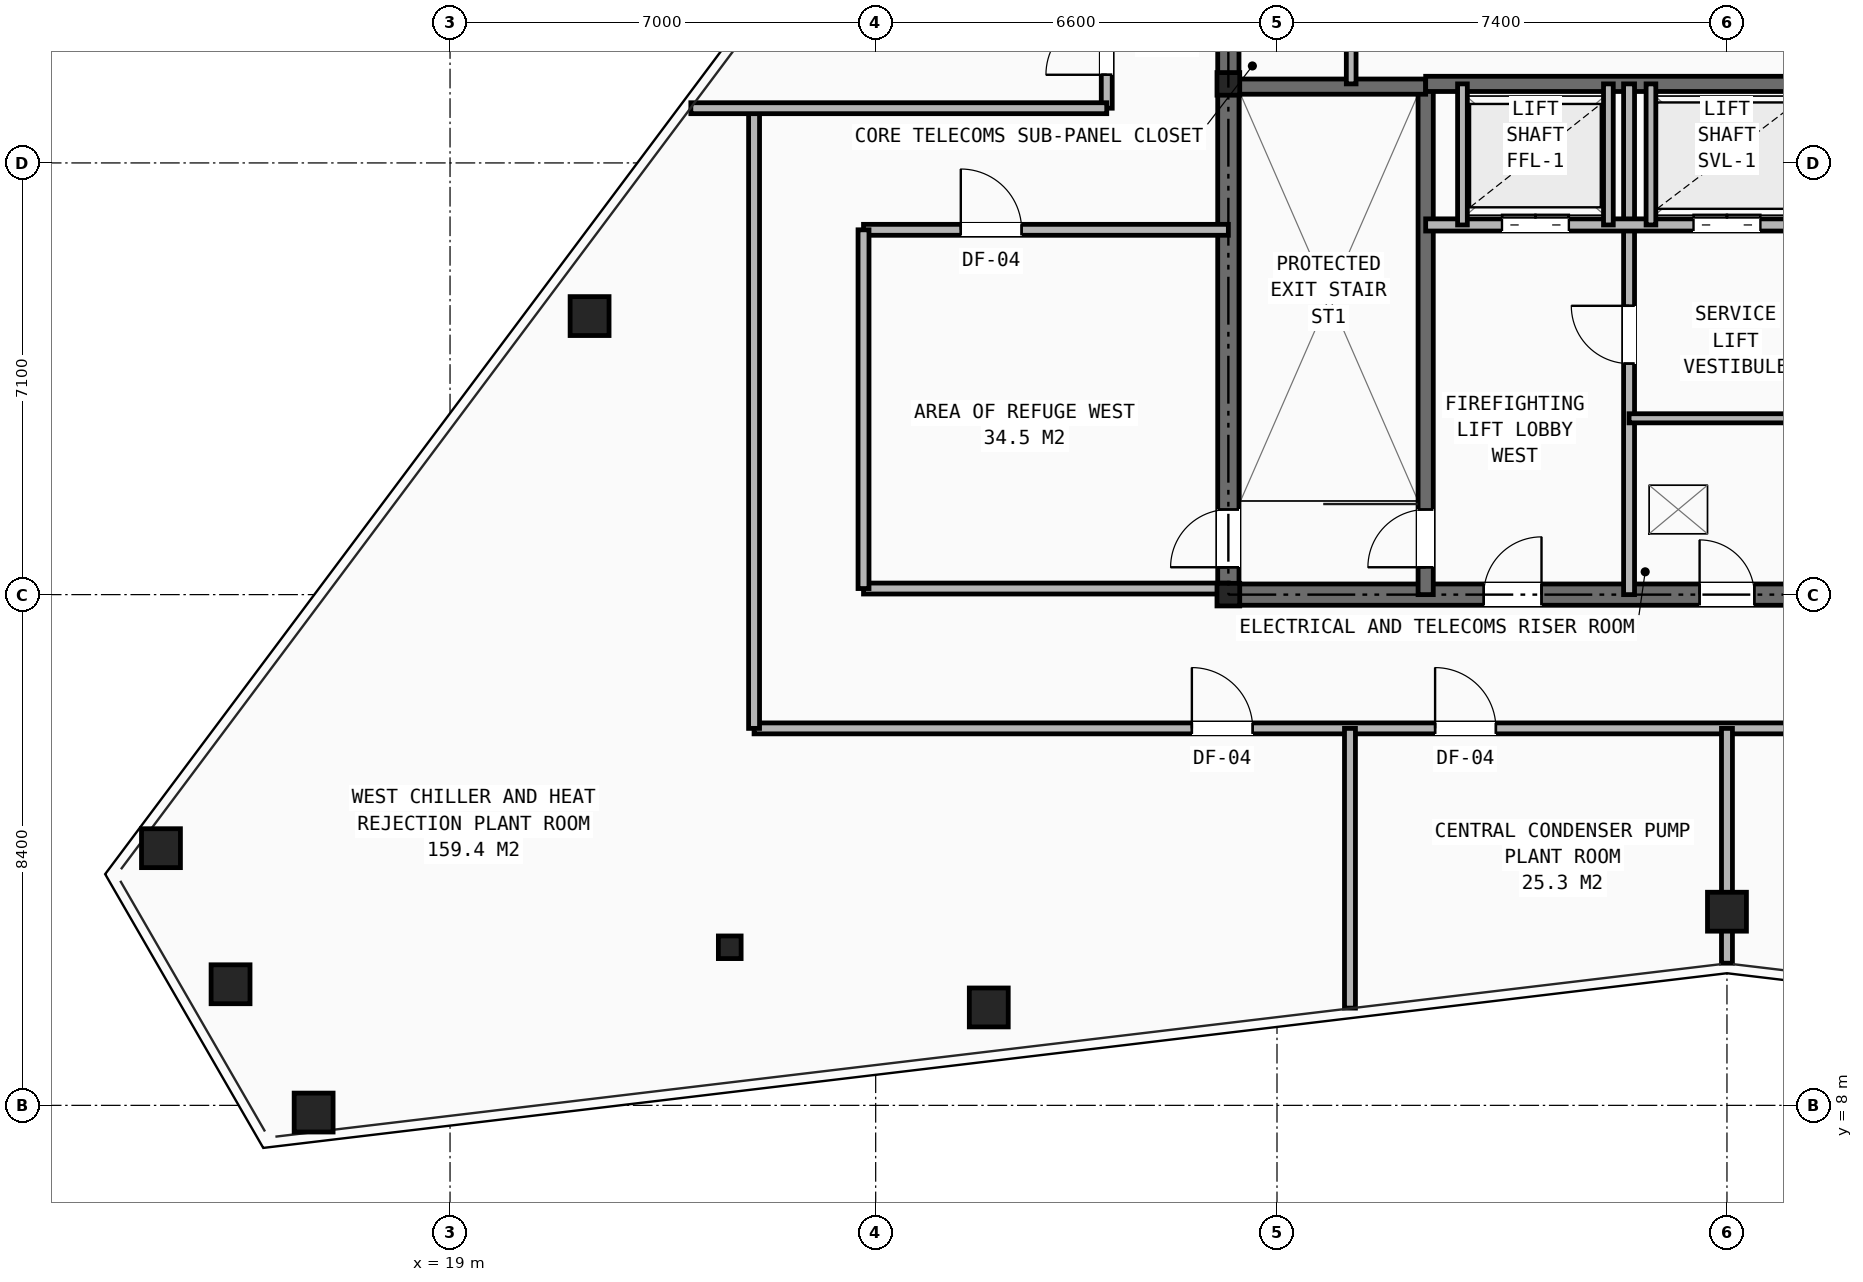
"""IFC4 building model, lengths in metres.
Left out: names, types, materials, properties, quantities, classifications, styles, units other than length and angle.
Written with IfcOpenShell. Run it as: python <this file> out.ifc"""

import sys

from ifc_helpers import new_model, si_unit, direction, frame, frame_2d, origin, origin_2d, place, context, subcontext, project, spatial, rectangle, hollow_rectangle, i_section, extrude, element, fill, save


model = new_model("IFC4")
c1 = context("Model", 3, precision=1e-05, world=origin(), true_north=direction((0.0, 1.0)))
c2 = subcontext(c1, "Body", "Model", "MODEL_VIEW")
j1 = project(units=[si_unit("LENGTHUNIT", "METRE"), si_unit("PLANEANGLEUNIT", "RADIAN")], contexts=[c1])
p1 = place(None, origin())
s1 = spatial("IfcSite", under=j1, at=p1, CompositionType="ELEMENT")
p2 = place(p1, origin())
s2 = spatial("IfcBuilding", under=s1, at=p2, CompositionType="ELEMENT")
p3 = place(p2, frame((0.0, 0.0, 290.0)))
s3 = spatial("IfcBuildingStorey", under=s2, at=p3, CompositionType="ELEMENT", Elevation=290.0)
for number, where, z_axis, x_axis in (
    (1, (31.8, 16.4, 0.0), (0.0, 0.0, 1.0), (1.0, 0.0, 0.0)),
    (2, (31.8, 24.8, 0.0), (0.0, 0.0, 1.0), (1.0, 0.0, 0.0)),
    (3, (23.6, 10.6, 0.0), (0.0, 0.0, 1.0), (1.0, 0.0, 0.0)),
):
    element("IfcColumn", number, at=place(p3, frame(where, z_axis=z_axis, x_axis=x_axis)), inside=s3, PredefinedType="COLUMN", context=c2, shape_type="SweptSolid", body=[
        extrude(i_section(OverallWidth=0.374, OverallDepth=0.372, WebThickness=0.016, FlangeThickness=0.026, at=origin_2d()), origin(), (0.0, 0.0, 1.0), 4.8),
    ])
for number, where, z_axis, x_axis in (
    (4, (21.295, 20.981, 0.0), (0.0, 0.0, 1.0), (1.0, 0.0, 0.0)),
    (5, (14.246, 12.23, 0.0), (0.0, 0.0, 1.0), (1.0, 0.0, 0.0)),
    (6, (15.39, 9.992, 0.0), (0.0, 0.0, 1.0), (1.0, 0.0, 0.0)),
    (7, (16.757, 7.882, 0.0), (0.0, 0.0, 1.0), (1.0, 0.0, 0.0)),
    (8, (27.86, 9.61, 0.0), (0.0, 0.0, 1.0), (1.0, 0.0, 0.0)),
    (9, (40.0, 11.185, 0.0), (0.0, 0.0, 1.0), (1.0, 0.0, 0.0)),
):
    element("IfcColumn", number, at=place(p3, frame(where, z_axis=z_axis, x_axis=x_axis)), inside=s3, PredefinedType="COLUMN", context=c2, shape_type="SweptSolid", body=[
        extrude(hollow_rectangle(XDim=0.64, YDim=0.64, WallThickness=0.045, at=origin_2d()), origin(), (0.0, 0.0, 1.0), 4.8),
    ])
p4 = place(p3, frame((31.8, 16.4, 0.0), z_axis=(0.0, 0.0, 1.0), x_axis=(1.0, 0.0, 0.0)))
e10 = element("IfcWall", 10, at=p4, inside=s3, PredefinedType="SHEAR", context=c2, shape_type="SweptSolid", body=[
    extrude(rectangle(XDim=16.4, YDim=0.35, at=frame_2d((8.2, 0.0))), origin(), (0.0, 0.0, 1.0), 4.54),
])
p5 = place(p4, frame((7.75, 0.0, 0.0)))
e11 = element("IfcOpeningElement", 11, at=p5, cuts=e10, PredefinedType="OPENING", context=c2, shape_type="SweptSolid", body=[
    extrude(rectangle(XDim=0.9, YDim=2.1, at=frame_2d((0.45, 1.05))), frame((0.0, 0.185, 0.0), z_axis=(0.0, -1.0, 0.0), x_axis=(1.0, 0.0, 0.0)), (0.0, 0.0, 1.0), 0.37),
])
p6 = place(p4, frame((4.2, 0.0, 0.0)))
e12 = element("IfcOpeningElement", 12, at=p6, cuts=e10, PredefinedType="OPENING", context=c2, shape_type="SweptSolid", body=[
    extrude(rectangle(XDim=0.95, YDim=2.1, at=frame_2d((0.475, 1.05))), frame((0.0, 0.185, 0.0), z_axis=(0.0, -1.0, 0.0), x_axis=(1.0, 0.0, 0.0)), (0.0, 0.0, 1.0), 0.37),
])
p7 = place(p4, frame((10.6, 0.0, 0.0)))
e13 = element("IfcOpeningElement", 13, at=p7, cuts=e10, PredefinedType="OPENING", context=c2, shape_type="SweptSolid", body=[
    extrude(rectangle(XDim=0.95, YDim=2.1, at=frame_2d((0.475, 1.05))), frame((0.0, 0.185, 0.0), z_axis=(0.0, -1.0, 0.0), x_axis=(1.0, 0.0, 0.0)), (0.0, 0.0, 1.0), 0.37),
])
p8 = place(p3, frame((31.8, 16.4, 0.0), z_axis=(0.0, 0.0, 1.0), x_axis=(0.0, 1.0, 0.0)))
e14 = element("IfcWall", 14, at=p8, inside=s3, PredefinedType="SHEAR", context=c2, shape_type="SweptSolid", body=[
    extrude(rectangle(XDim=14.8, YDim=0.35, at=frame_2d((7.4, 0.0))), origin(), (0.0, 0.0, 1.0), 4.54),
])
p9 = place(p8, frame((11.0, 0.0, 0.0)))
e15 = element("IfcOpeningElement", 15, at=p9, cuts=e14, PredefinedType="OPENING", context=c2, shape_type="SweptSolid", body=[
    extrude(rectangle(XDim=1.1, YDim=2.15, at=frame_2d((0.55, 1.075))), frame((0.0, 0.185, 0.0), z_axis=(0.0, -1.0, 0.0), x_axis=(1.0, 0.0, 0.0)), (0.0, 0.0, 1.0), 0.37),
])
p10 = place(p8, frame((0.45, 0.0, 0.0)))
e16 = element("IfcOpeningElement", 16, at=p10, cuts=e14, PredefinedType="OPENING", context=c2, shape_type="SweptSolid", body=[
    extrude(rectangle(XDim=0.95, YDim=2.1, at=frame_2d((0.475, 1.05))), frame((0.0, 0.185, 0.0), z_axis=(0.0, -1.0, 0.0), x_axis=(1.0, 0.0, 0.0)), (0.0, 0.0, 1.0), 0.37),
])
p11 = place(p3, frame((35.045, 16.4, 0.0), z_axis=(0.0, 0.0, 1.0), x_axis=(0.0, 1.0, 0.0)))
e17 = element("IfcWall", 17, at=p11, inside=s3, PredefinedType="SHEAR", context=c2, shape_type="SweptSolid", body=[
    extrude(rectangle(XDim=8.4, YDim=0.25, at=frame_2d((4.2, 0.0))), origin(), (0.0, 0.0, 1.0), 4.54),
])
p12 = place(p11, frame((0.45, 0.0, 0.0)))
e18 = element("IfcOpeningElement", 18, at=p12, cuts=e17, PredefinedType="OPENING", context=c2, shape_type="SweptSolid", body=[
    extrude(rectangle(XDim=0.95, YDim=2.1, at=frame_2d((0.475, 1.05))), frame((0.0, 0.135, 0.0), z_axis=(0.0, -1.0, 0.0), x_axis=(1.0, 0.0, 0.0)), (0.0, 0.0, 1.0), 0.27),
])
p13 = place(p3, frame((31.8, 24.755, 0.0), z_axis=(0.0, 0.0, 1.0), x_axis=(1.0, 0.0, 0.0)))
e19 = element("IfcWall", 19, at=p13, inside=s3, PredefinedType="SHEAR", context=c2, shape_type="SweptSolid", body=[
    extrude(rectangle(XDim=3.245, YDim=0.25, at=frame_2d((1.623, 0.0))), origin(), (0.0, 0.0, 1.0), 4.54),
])
p14 = place(p3, frame((35.045, 24.8, 0.0), z_axis=(0.0, 0.0, 1.0), x_axis=(1.0, 0.0, 0.0)))
e20 = element("IfcWall", 20, at=p14, inside=s3, PredefinedType="SHEAR", context=c2, shape_type="SweptSolid", body=[
    extrude(rectangle(XDim=9.91, YDim=0.25, at=frame_2d((4.955, 0.0))), origin(), (0.0, 0.0, 1.0), 4.54),
])
p15 = place(p3, frame((38.39, 16.4, 0.0), z_axis=(0.0, 0.0, 1.0), x_axis=(0.0, 1.0, 0.0)))
e21 = element("IfcWall", 21, at=p15, inside=s3, PredefinedType="PARTITIONING", context=c2, shape_type="SweptSolid", body=[
    extrude(rectangle(XDim=8.4, YDim=0.18, at=frame_2d((4.2, 0.0))), origin(), (0.0, 0.0, 1.0), 3.995),
])
p16 = place(p15, frame((3.8, 0.0, 0.0)))
e22 = element("IfcOpeningElement", 22, at=p16, cuts=e21, PredefinedType="OPENING", context=c2, shape_type="SweptSolid", body=[
    extrude(rectangle(XDim=0.95, YDim=2.1, at=frame_2d((0.475, 1.05))), frame((0.0, 0.1, 0.0), z_axis=(0.0, -1.0, 0.0), x_axis=(1.0, 0.0, 0.0)), (0.0, 0.0, 1.0), 0.2),
])
p17 = place(p3, frame((35.045, 22.48, 0.0), z_axis=(0.0, 0.0, 1.0), x_axis=(1.0, 0.0, 0.0)))
e23 = element("IfcWall", 23, at=p17, inside=s3, PredefinedType="SOLIDWALL", context=c2, shape_type="SweptSolid", body=[
    extrude(rectangle(XDim=9.91, YDim=0.2, at=frame_2d((4.955, 0.0))), origin(), (0.0, 0.0, 1.0), 4.54),
])
p18 = place(p17, frame((1.255, 0.0, 0.0)))
e24 = element("IfcOpeningElement", 24, at=p18, cuts=e23, PredefinedType="OPENING", context=c2, shape_type="SweptSolid", body=[
    extrude(rectangle(XDim=1.1, YDim=2.15, at=frame_2d((0.55, 1.075))), frame((0.0, 0.11, 0.0), z_axis=(0.0, -1.0, 0.0), x_axis=(1.0, 0.0, 0.0)), (0.0, 0.0, 1.0), 0.22),
])
p19 = place(p17, frame((7.555, 0.0, 0.0)))
e25 = element("IfcOpeningElement", 25, at=p19, cuts=e23, PredefinedType="OPENING", context=c2, shape_type="SweptSolid", body=[
    extrude(rectangle(XDim=1.1, YDim=2.15, at=frame_2d((0.55, 1.075))), frame((0.0, 0.11, 0.0), z_axis=(0.0, -1.0, 0.0), x_axis=(1.0, 0.0, 0.0)), (0.0, 0.0, 1.0), 0.22),
])
p20 = place(p17, frame((4.405, 0.0, 0.0)))
e26 = element("IfcOpeningElement", 26, at=p20, cuts=e23, PredefinedType="OPENING", context=c2, shape_type="SweptSolid", body=[
    extrude(rectangle(XDim=1.1, YDim=2.15, at=frame_2d((0.55, 1.075))), frame((0.0, 0.11, 0.0), z_axis=(0.0, -1.0, 0.0), x_axis=(1.0, 0.0, 0.0)), (0.0, 0.0, 1.0), 0.22),
])
p21 = place(p3, frame((38.39, 19.3, 0.0), z_axis=(0.0, 0.0, 1.0), x_axis=(1.0, 0.0, 0.0)))
e27 = element("IfcWall", 27, at=p21, inside=s3, PredefinedType="PARTITIONING", context=c2, shape_type="SweptSolid", body=[
    extrude(rectangle(XDim=3.22, YDim=0.15, at=frame_2d((1.61, 0.0))), origin(), (0.0, 0.0, 1.0), 4.54),
])
for number, where, z_axis, x_axis in (
    (28, (35.65, 22.48, 0.0), (0.0, 0.0, 1.0), (0.0, 1.0, 0.0)),
    (29, (38.05, 22.48, 0.0), (0.0, 0.0, 1.0), (0.0, 1.0, 0.0)),
    (30, (38.75, 22.48, 0.0), (0.0, 0.0, 1.0), (0.0, 1.0, 0.0)),
):
    element("IfcWall", number, at=place(p3, frame(where, z_axis=z_axis, x_axis=x_axis)), inside=s3, PredefinedType="SOLIDWALL", context=c2, shape_type="SweptSolid", body=[
        extrude(rectangle(XDim=2.32, YDim=0.16, at=frame_2d((1.16, 0.0))), origin(), (0.0, 0.0, 1.0), 4.54),
    ])
p22 = place(p3, frame((33.82, 24.8, 0.0), z_axis=(0.0, 0.0, 1.0), x_axis=(0.0, 1.0, 0.0)))
e31 = element("IfcWall", 31, at=p22, inside=s3, PredefinedType="SOLIDWALL", context=c2, shape_type="SweptSolid", body=[
    extrude(rectangle(XDim=2.08, YDim=0.16, at=frame_2d((1.04, 0.0))), origin(), (0.0, 0.0, 1.0), 4.54),
])
p23 = place(p3, frame((24.0, 14.2, 0.0), z_axis=(0.0, 0.0, 1.0), x_axis=(1.0, 0.0, 0.0)))
e32 = element("IfcWall", 32, at=p23, inside=s3, PredefinedType="PARTITIONING", context=c2, shape_type="SweptSolid", body=[
    extrude(rectangle(XDim=32.0, YDim=0.18, at=frame_2d((16.0, 0.0))), origin(), (0.0, 0.0, 1.0), 3.582),
])
p24 = place(p23, frame((7.2, 0.0, 0.0)))
e33 = element("IfcOpeningElement", 33, at=p24, cuts=e32, PredefinedType="OPENING", context=c2, shape_type="SweptSolid", body=[
    extrude(rectangle(XDim=1.0, YDim=2.15, at=frame_2d((0.5, 1.075))), frame((0.0, 0.1, 0.0), z_axis=(0.0, -1.0, 0.0), x_axis=(1.0, 0.0, 0.0)), (0.0, 0.0, 1.0), 0.2),
])
p25 = place(p23, frame((11.2, 0.0, 0.0)))
e34 = element("IfcOpeningElement", 34, at=p25, cuts=e32, PredefinedType="OPENING", context=c2, shape_type="SweptSolid", body=[
    extrude(rectangle(XDim=1.0, YDim=2.15, at=frame_2d((0.5, 1.075))), frame((0.0, 0.1, 0.0), z_axis=(0.0, -1.0, 0.0), x_axis=(1.0, 0.0, 0.0)), (0.0, 0.0, 1.0), 0.2),
])
p26 = place(p23, frame((17.5, 0.0, 0.0)))
e35 = element("IfcOpeningElement", 35, at=p26, cuts=e32, PredefinedType="OPENING", context=c2, shape_type="SweptSolid", body=[
    extrude(rectangle(XDim=1.0, YDim=2.15, at=frame_2d((0.5, 1.075))), frame((0.0, 0.1, 0.0), z_axis=(0.0, -1.0, 0.0), x_axis=(1.0, 0.0, 0.0)), (0.0, 0.0, 1.0), 0.2),
])
p27 = place(p23, frame((23.2, 0.0, 0.0)))
e36 = element("IfcOpeningElement", 36, at=p27, cuts=e32, PredefinedType="OPENING", context=c2, shape_type="SweptSolid", body=[
    extrude(rectangle(XDim=1.0, YDim=2.15, at=frame_2d((0.5, 1.075))), frame((0.0, 0.1, 0.0), z_axis=(0.0, -1.0, 0.0), x_axis=(1.0, 0.0, 0.0)), (0.0, 0.0, 1.0), 0.2),
])
p28 = place(p3, frame((24.0, 14.2, 0.0), z_axis=(0.0, 0.0, 1.0), x_axis=(0.0, 1.0, 0.0)))
e37 = element("IfcWall", 37, at=p28, inside=s3, PredefinedType="PARTITIONING", context=c2, shape_type="SweptSolid", body=[
    extrude(rectangle(XDim=10.2, YDim=0.18, at=frame_2d((5.1, 0.0))), origin(), (0.0, 0.0, 1.0), 3.918),
])
p29 = place(p3, frame((29.8, 24.4, 0.0), z_axis=(0.0, 0.0, 1.0), x_axis=(0.0, 1.0, 0.0)))
e38 = element("IfcWall", 38, at=p29, inside=s3, PredefinedType="PARTITIONING", context=c2, shape_type="SweptSolid", body=[
    extrude(rectangle(XDim=8.6, YDim=0.18, at=frame_2d((4.3, 0.0))), origin(), (0.0, 0.0, 1.0), 3.582),
])
p30 = place(p29, frame((0.55, 0.0, 0.0)))
e39 = element("IfcOpeningElement", 39, at=p30, cuts=e38, PredefinedType="OPENING", context=c2, shape_type="SweptSolid", body=[
    extrude(rectangle(XDim=1.0, YDim=2.15, at=frame_2d((0.5, 1.075))), frame((0.0, 0.1, 0.0), z_axis=(0.0, -1.0, 0.0), x_axis=(1.0, 0.0, 0.0)), (0.0, 0.0, 1.0), 0.2),
])
p31 = place(p3, frame((25.8, 16.5, 0.0), z_axis=(0.0, 0.0, 1.0), x_axis=(1.0, 0.0, 0.0)))
e40 = element("IfcWall", 40, at=p31, inside=s3, PredefinedType="PARTITIONING", context=c2, shape_type="SweptSolid", body=[
    extrude(rectangle(XDim=6.0, YDim=0.18, at=frame_2d((3.0, 0.0))), origin(), (0.0, 0.0, 1.0), 3.582),
])
p32 = place(p3, frame((25.8, 22.4, 0.0), z_axis=(0.0, 0.0, 1.0), x_axis=(1.0, 0.0, 0.0)))
e41 = element("IfcWall", 41, at=p32, inside=s3, PredefinedType="PARTITIONING", context=c2, shape_type="SweptSolid", body=[
    extrude(rectangle(XDim=6.0, YDim=0.18, at=frame_2d((3.0, 0.0))), origin(), (0.0, 0.0, 1.0), 3.995),
])
p33 = place(p32, frame((1.6, 0.0, 0.0)))
e42 = element("IfcOpeningElement", 42, at=p33, cuts=e41, PredefinedType="OPENING", context=c2, shape_type="SweptSolid", body=[
    extrude(rectangle(XDim=1.0, YDim=2.15, at=frame_2d((0.5, 1.075))), frame((0.0, 0.1, 0.0), z_axis=(0.0, -1.0, 0.0), x_axis=(1.0, 0.0, 0.0)), (0.0, 0.0, 1.0), 0.2),
])
p34 = place(p3, frame((25.8, 16.5, 0.0), z_axis=(0.0, 0.0, 1.0), x_axis=(0.0, 1.0, 0.0)))
e43 = element("IfcWall", 43, at=p34, inside=s3, PredefinedType="PARTITIONING", context=c2, shape_type="SweptSolid", body=[
    extrude(rectangle(XDim=5.9, YDim=0.18, at=frame_2d((2.95, 0.0))), origin(), (0.0, 0.0, 1.0), 4.123),
])
p35 = place(p3, frame((22.96, 24.4, 0.0), z_axis=(0.0, 0.0, 1.0), x_axis=(1.0, 0.0, 0.0)))
e44 = element("IfcWall", 44, at=p35, inside=s3, PredefinedType="PARTITIONING", context=c2, shape_type="SweptSolid", body=[
    extrude(rectangle(XDim=6.84, YDim=0.18, at=frame_2d((3.42, 0.0))), origin(), (0.0, 0.0, 1.0), 3.918),
])
p36 = place(p3, frame((33.8, 9.599, 0.0), z_axis=(0.0, 0.0, 1.0), x_axis=(0.0, 1.0, 0.0)))
e45 = element("IfcWall", 45, at=p36, inside=s3, PredefinedType="PARTITIONING", context=c2, shape_type="SweptSolid", body=[
    extrude(rectangle(XDim=4.601, YDim=0.18, at=frame_2d((2.3, 0.0))), origin(), (0.0, 0.0, 1.0), 3.918),
])
p37 = place(p3, frame((40.0, 10.338, 0.0), z_axis=(0.0, 0.0, 1.0), x_axis=(0.0, 1.0, 0.0)))
e46 = element("IfcWall", 46, at=p37, inside=s3, PredefinedType="PARTITIONING", context=c2, shape_type="SweptSolid", body=[
    extrude(rectangle(XDim=3.862, YDim=0.18, at=frame_2d((1.931, 0.0))), origin(), (0.0, 0.0, 1.0), 3.582),
])
p38 = place(p5, origin())
e47 = element("IfcDoor", 47, at=p38, inside=s3, OperationType="SINGLE_SWING_LEFT", PredefinedType="DOOR", context=c2, shape_type="SweptSolid", body=[
    extrude(rectangle(XDim=0.9, YDim=2.1, at=frame_2d((0.45, 1.05))), frame((0.0, 0.025, 0.0), z_axis=(0.0, -1.0, 0.0), x_axis=(1.0, 0.0, 0.0)), (0.0, 0.0, 1.0), 0.05),
])
fill(e11, e47)
p39 = place(p16, origin())
e48 = element("IfcDoor", 48, at=p39, inside=s3, OperationType="SINGLE_SWING_RIGHT", PredefinedType="DOOR", context=c2, shape_type="SweptSolid", body=[
    extrude(rectangle(XDim=0.95, YDim=2.1, at=frame_2d((0.475, 1.05))), frame((0.0, 0.025, 0.0), z_axis=(0.0, -1.0, 0.0), x_axis=(1.0, 0.0, 0.0)), (0.0, 0.0, 1.0), 0.05),
])
fill(e22, e48)
p40 = place(p12, origin())
e49 = element("IfcDoor", 49, at=p40, inside=s3, OperationType="SINGLE_SWING_LEFT", PredefinedType="DOOR", context=c2, shape_type="SweptSolid", body=[
    extrude(rectangle(XDim=0.95, YDim=2.1, at=frame_2d((0.475, 1.05))), frame((0.0, 0.025, 0.0), z_axis=(0.0, -1.0, 0.0), x_axis=(1.0, 0.0, 0.0)), (0.0, 0.0, 1.0), 0.05),
])
fill(e18, e49)
p41 = place(p6, origin())
e50 = element("IfcDoor", 50, at=p41, inside=s3, OperationType="SINGLE_SWING_RIGHT", PredefinedType="DOOR", context=c2, shape_type="SweptSolid", body=[
    extrude(rectangle(XDim=0.95, YDim=2.1, at=frame_2d((0.475, 1.05))), frame((0.0, 0.025, 0.0), z_axis=(0.0, -1.0, 0.0), x_axis=(1.0, 0.0, 0.0)), (0.0, 0.0, 1.0), 0.05),
])
fill(e12, e50)
p42 = place(p18, origin())
e51 = element("IfcDoor", 51, at=p42, inside=s3, OperationType="DOUBLE_DOOR_SLIDING", PredefinedType="DOOR", context=c2, shape_type="SweptSolid", body=[
    extrude(rectangle(XDim=1.1, YDim=2.15, at=frame_2d((0.55, 1.075))), frame((0.0, 0.025, 0.0), z_axis=(0.0, -1.0, 0.0), x_axis=(1.0, 0.0, 0.0)), (0.0, 0.0, 1.0), 0.05),
])
fill(e24, e51)
p43 = place(p20, origin())
e52 = element("IfcDoor", 52, at=p43, inside=s3, OperationType="DOUBLE_DOOR_SLIDING", PredefinedType="DOOR", context=c2, shape_type="SweptSolid", body=[
    extrude(rectangle(XDim=1.1, YDim=2.15, at=frame_2d((0.55, 1.075))), frame((0.0, 0.025, 0.0), z_axis=(0.0, -1.0, 0.0), x_axis=(1.0, 0.0, 0.0)), (0.0, 0.0, 1.0), 0.05),
])
fill(e26, e52)
p44 = place(p10, origin())
e53 = element("IfcDoor", 53, at=p44, inside=s3, OperationType="SINGLE_SWING_LEFT", PredefinedType="DOOR", context=c2, shape_type="SweptSolid", body=[
    extrude(rectangle(XDim=0.95, YDim=2.1, at=frame_2d((0.475, 1.05))), frame((0.0, 0.025, 0.0), z_axis=(0.0, -1.0, 0.0), x_axis=(1.0, 0.0, 0.0)), (0.0, 0.0, 1.0), 0.05),
])
fill(e16, e53)
p45 = place(p33, origin())
e54 = element("IfcDoor", 54, at=p45, inside=s3, OperationType="SINGLE_SWING_LEFT", PredefinedType="DOOR", context=c2, shape_type="SweptSolid", body=[
    extrude(rectangle(XDim=1.0, YDim=2.15, at=frame_2d((0.5, 1.075))), frame((0.0, 0.025, 0.0), z_axis=(0.0, -1.0, 0.0), x_axis=(1.0, 0.0, 0.0)), (0.0, 0.0, 1.0), 0.05),
])
fill(e42, e54)
p46 = place(p24, origin())
e55 = element("IfcDoor", 55, at=p46, inside=s3, OperationType="SINGLE_SWING_LEFT", PredefinedType="DOOR", context=c2, shape_type="SweptSolid", body=[
    extrude(rectangle(XDim=1.0, YDim=2.15, at=frame_2d((0.5, 1.075))), frame((0.0, 0.025, 0.0), z_axis=(0.0, -1.0, 0.0), x_axis=(1.0, 0.0, 0.0)), (0.0, 0.0, 1.0), 0.05),
])
fill(e33, e55)
p47 = place(p25, origin())
e56 = element("IfcDoor", 56, at=p47, inside=s3, OperationType="SINGLE_SWING_LEFT", PredefinedType="DOOR", context=c2, shape_type="SweptSolid", body=[
    extrude(rectangle(XDim=1.0, YDim=2.15, at=frame_2d((0.5, 1.075))), frame((0.0, 0.025, 0.0), z_axis=(0.0, -1.0, 0.0), x_axis=(1.0, 0.0, 0.0)), (0.0, 0.0, 1.0), 0.05),
])
fill(e34, e56)
p48 = place(p30, origin())
e57 = element("IfcDoor", 57, at=p48, inside=s3, OperationType="SINGLE_SWING_LEFT", PredefinedType="DOOR", context=c2, shape_type="SweptSolid", body=[
    extrude(rectangle(XDim=1.0, YDim=2.15, at=frame_2d((0.5, 1.075))), frame((0.0, 0.025, 0.0), z_axis=(0.0, -1.0, 0.0), x_axis=(1.0, 0.0, 0.0)), (0.0, 0.0, 1.0), 0.05),
])
fill(e39, e57)
save(model, sys.argv[1])
